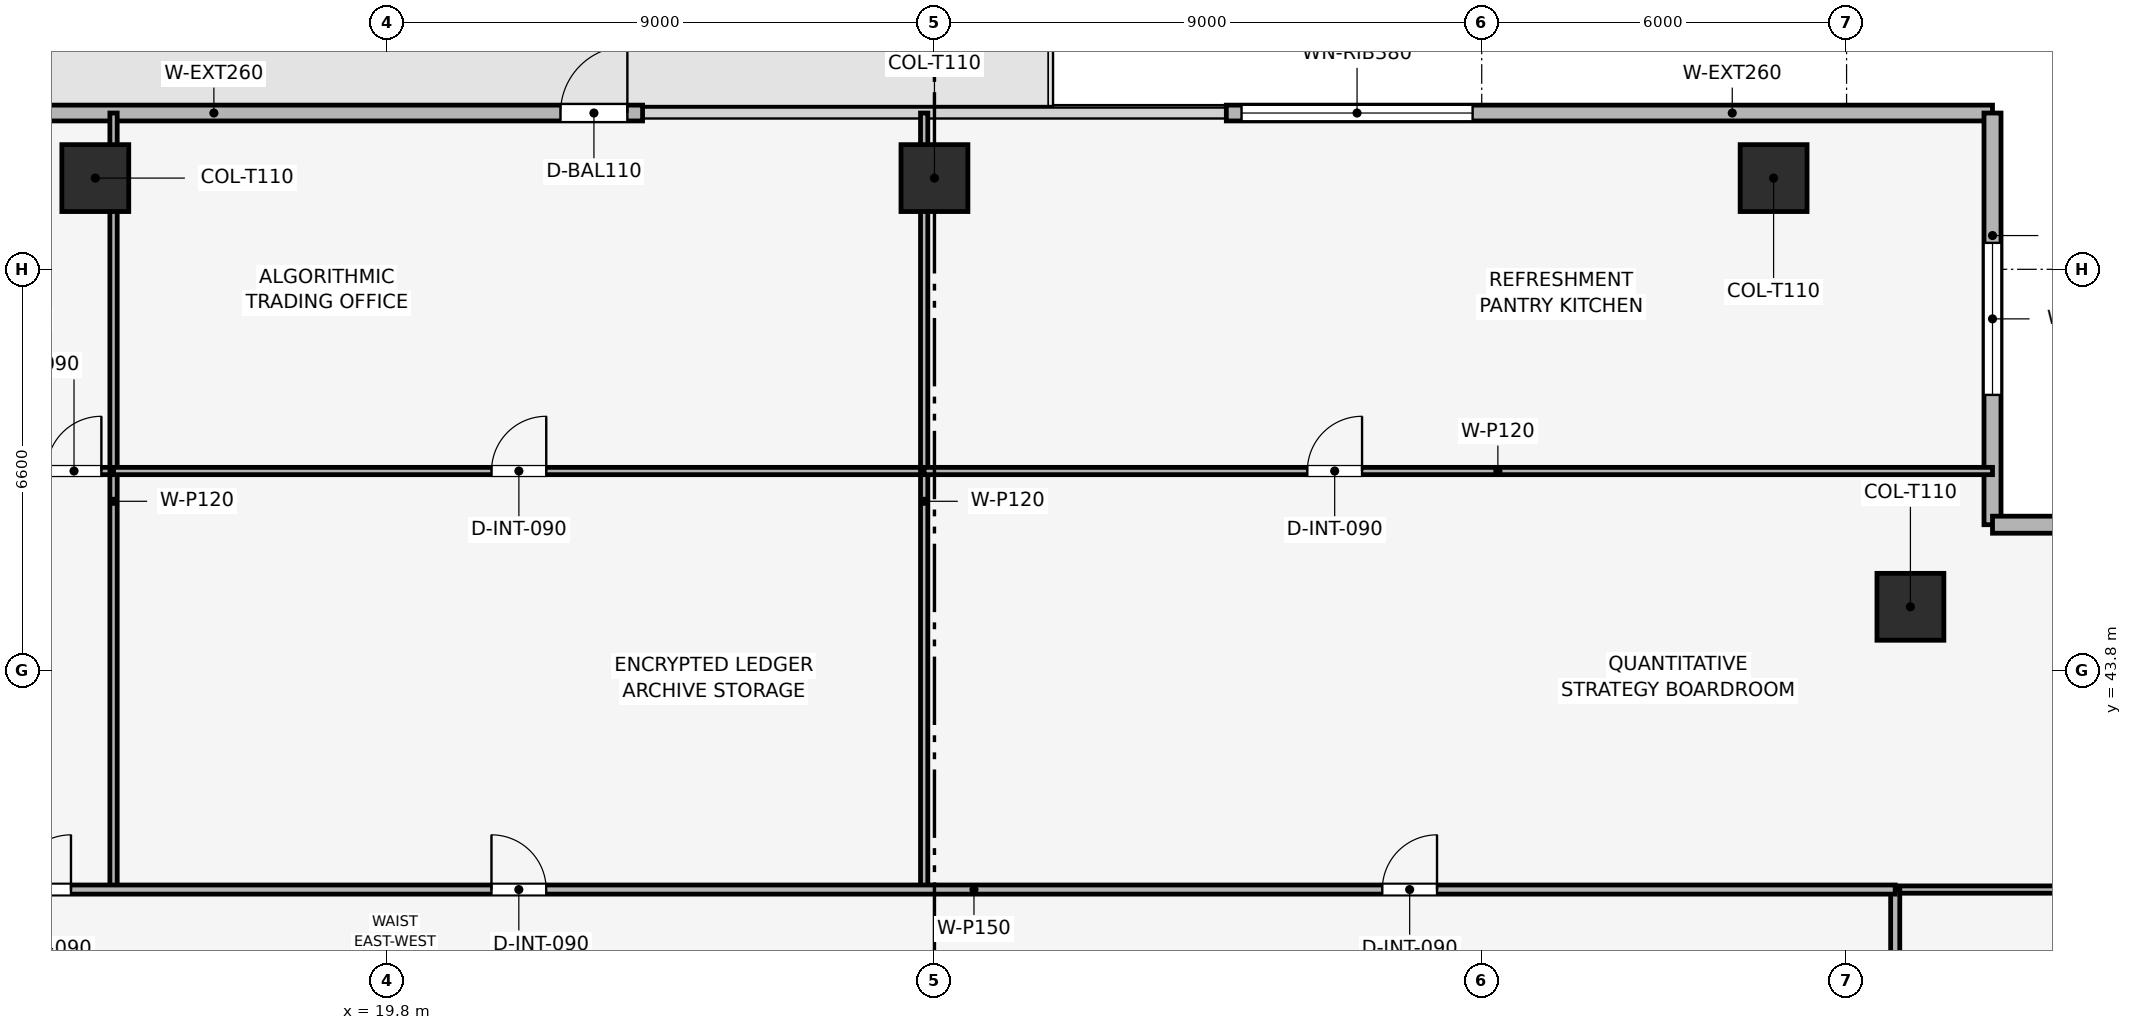
"""IFC4 building model, lengths in metres.
Left out: names, types, materials, properties, quantities, classifications, styles, units other than length and angle.
Written with IfcOpenShell. Run it as: python <this file> out.ifc"""

import sys

from ifc_helpers import new_model, si_unit, direction, frame, frame_2d, origin, origin_2d, place, context, subcontext, project, spatial, rectangle, extrude, element, fill, save


model = new_model("IFC4")
c1 = context("Model", 3, precision=1e-05, world=origin(), true_north=direction((0.0, 1.0)))
c2 = subcontext(c1, "Body", "Model", "MODEL_VIEW")
j1 = project(units=[si_unit("LENGTHUNIT", "METRE"), si_unit("PLANEANGLEUNIT", "RADIAN")], contexts=[c1])
p1 = place(None, origin())
s1 = spatial("IfcSite", under=j1, at=p1, CompositionType="ELEMENT")
p2 = place(p1, origin())
s2 = spatial("IfcBuilding", under=s1, at=p2, CompositionType="ELEMENT")
p3 = place(p2, frame((0.0, 0.0, 153.3)))
s3 = spatial("IfcBuildingStorey", under=s2, at=p3, CompositionType="ELEMENT", Elevation=153.3)
for number, where, z_axis, x_axis in (
    (1, (42.6, 51.9, 0.003), (0.0, 0.0, 1.0), (1.0, 0.0, 0.0)),
    (2, (28.8, 51.9, 0.003), (0.0, 0.0, 1.0), (1.0, 0.0, 0.0)),
    (3, (15.0, 51.9, 0.003), (0.0, 0.0, 1.0), (1.0, 0.0, 0.0)),
    (4, (44.85, 44.85, 0.003), (0.0, 0.0, 1.0), (1.0, 0.0, 0.0)),
):
    element("IfcColumn", number, at=place(p3, frame(where, z_axis=z_axis, x_axis=x_axis)), inside=s3, PredefinedType="COLUMN", context=c2, shape_type="SweptSolid", body=[
        extrude(rectangle(XDim=1.1, YDim=1.1, at=origin_2d()), origin(), (0.0, 0.0, 1.0), 3.489),
    ])
p4 = place(p3, frame((11.4, 52.97, 0.0), z_axis=(0.0, 0.0, 1.0), x_axis=(1.0, 0.0, 0.0)))
e5 = element("IfcWall", 5, at=p4, inside=s3, PredefinedType="SOLIDWALL", context=c2, shape_type="SweptSolid", body=[
    extrude(rectangle(XDim=12.6, YDim=0.26, at=frame_2d((6.3, 0.0))), origin(), (0.0, 0.0, 1.0), 3.495),
])
p5 = place(p4, frame((11.25, 0.0, 0.0)))
e6 = element("IfcOpeningElement", 6, at=p5, cuts=e5, PredefinedType="OPENING", context=c2, shape_type="SweptSolid", body=[
    extrude(rectangle(XDim=1.1, YDim=2.2, at=frame_2d((0.55, 1.1))), frame((0.0, 0.14, 0.0), z_axis=(0.0, -1.0, 0.0), x_axis=(1.0, 0.0, 0.0)), (0.0, 0.0, 1.0), 0.28),
])
p6 = place(p3, frame((33.6, 52.97, 0.0), z_axis=(0.0, 0.0, 1.0), x_axis=(1.0, 0.0, 0.0)))
e7 = element("IfcWall", 7, at=p6, inside=s3, PredefinedType="SOLIDWALL", context=c2, shape_type="SweptSolid", body=[
    extrude(rectangle(XDim=12.6, YDim=0.26, at=frame_2d((6.3, 0.0))), origin(), (0.0, 0.0, 1.0), 3.495),
])
p7 = place(p6, frame((0.25, 0.0, 0.9)))
e8 = element("IfcOpeningElement", 8, at=p7, cuts=e7, PredefinedType="OPENING", context=c2, shape_type="SweptSolid", body=[
    extrude(rectangle(XDim=3.8, YDim=1.9, at=frame_2d((1.9, 0.95))), frame((0.0, 0.14, 0.0), z_axis=(0.0, -1.0, 0.0), x_axis=(1.0, 0.0, 0.0)), (0.0, 0.0, 1.0), 0.28),
])
p8 = place(p3, frame((46.2, 52.97, 0.0), z_axis=(0.0, 0.0, 1.0), x_axis=(0.0, -1.0, 0.0)))
e9 = element("IfcWall", 9, at=p8, inside=s3, PredefinedType="SOLIDWALL", context=c2, shape_type="SweptSolid", body=[
    extrude(rectangle(XDim=6.77, YDim=0.28, at=frame_2d((3.385, 0.0))), origin(), (0.0, 0.0, 1.0), 3.495),
])
p9 = place(p8, frame((2.135, 0.0, 0.9)))
e10 = element("IfcOpeningElement", 10, at=p9, cuts=e9, PredefinedType="OPENING", context=c2, shape_type="SweptSolid", body=[
    extrude(rectangle(XDim=2.5, YDim=1.9, at=frame_2d((1.25, 0.95))), frame((0.0, 0.15, 0.0), z_axis=(0.0, -1.0, 0.0), x_axis=(1.0, 0.0, 0.0)), (0.0, 0.0, 1.0), 0.3),
])
p10 = place(p3, frame((46.2, 46.2, 0.0), z_axis=(0.0, 0.0, 1.0), x_axis=(1.0, 0.0, 0.0)))
e11 = element("IfcWall", 11, at=p10, inside=s3, PredefinedType="SOLIDWALL", context=c2, shape_type="SweptSolid", body=[
    extrude(rectangle(XDim=6.77, YDim=0.28, at=frame_2d((3.385, 0.0))), origin(), (0.0, 0.0, 1.0), 3.495),
])
p11 = place(p10, frame((2.135, 0.0, 0.9)))
e12 = element("IfcOpeningElement", 12, at=p11, cuts=e11, PredefinedType="OPENING", context=c2, shape_type="SweptSolid", body=[
    extrude(rectangle(XDim=2.5, YDim=1.9, at=frame_2d((1.25, 0.95))), frame((0.0, 0.15, 0.0), z_axis=(0.0, -1.0, 0.0), x_axis=(1.0, 0.0, 0.0)), (0.0, 0.0, 1.0), 0.3),
])
p12 = place(p3, frame((11.4, 47.083, 0.0), z_axis=(0.0, 0.0, 1.0), x_axis=(1.0, 0.0, 0.0)))
e13 = element("IfcWall", 13, at=p12, inside=s3, PredefinedType="PARTITIONING", context=c2, shape_type="SweptSolid", body=[
    extrude(rectangle(XDim=3.9, YDim=0.12, at=frame_2d((1.95, 0.0))), origin(), (0.0, 0.0, 1.0), 2.98),
])
p13 = place(p12, frame((2.8, 0.0, 0.0)))
e14 = element("IfcOpeningElement", 14, at=p13, cuts=e13, PredefinedType="OPENING", context=c2, shape_type="SweptSolid", body=[
    extrude(rectangle(XDim=0.9, YDim=2.1, at=frame_2d((0.45, 1.05))), frame((0.0, 0.07, 0.0), z_axis=(0.0, -1.0, 0.0), x_axis=(1.0, 0.0, 0.0)), (0.0, 0.0, 1.0), 0.14),
])
p14 = place(p3, frame((15.3, 40.2, 0.0), z_axis=(0.0, 0.0, 1.0), x_axis=(0.0, 1.0, 0.0)))
e15 = element("IfcWall", 15, at=p14, inside=s3, PredefinedType="PARTITIONING", context=c2, shape_type="SweptSolid", body=[
    extrude(rectangle(XDim=12.77, YDim=0.12, at=frame_2d((6.385, 0.0))), origin(), (0.0, 0.0, 1.0), 2.98),
])
p15 = place(p3, frame((15.3, 47.083, 0.0), z_axis=(0.0, 0.0, 1.0), x_axis=(1.0, 0.0, 0.0)))
e16 = element("IfcWall", 16, at=p15, inside=s3, PredefinedType="PARTITIONING", context=c2, shape_type="SweptSolid", body=[
    extrude(rectangle(XDim=13.331, YDim=0.12, at=frame_2d((6.666, 0.0))), origin(), (0.0, 0.0, 1.0), 3.03),
])
p16 = place(p15, frame((6.216, 0.0, 0.0)))
e17 = element("IfcOpeningElement", 17, at=p16, cuts=e16, PredefinedType="OPENING", context=c2, shape_type="SweptSolid", body=[
    extrude(rectangle(XDim=0.9, YDim=2.1, at=frame_2d((0.45, 1.05))), frame((0.0, 0.07, 0.0), z_axis=(0.0, -1.0, 0.0), x_axis=(1.0, 0.0, 0.0)), (0.0, 0.0, 1.0), 0.14),
])
p17 = place(p3, frame((28.631, 40.2, 0.0), z_axis=(0.0, 0.0, 1.0), x_axis=(0.0, 1.0, 0.0)))
e18 = element("IfcWall", 18, at=p17, inside=s3, PredefinedType="PARTITIONING", context=c2, shape_type="SweptSolid", body=[
    extrude(rectangle(XDim=12.77, YDim=0.12, at=frame_2d((6.385, 0.0))), origin(), (0.0, 0.0, 1.0), 2.98),
])
p18 = place(p3, frame((28.631, 47.083, 0.0), z_axis=(0.0, 0.0, 1.0), x_axis=(1.0, 0.0, 0.0)))
e19 = element("IfcWall", 19, at=p18, inside=s3, PredefinedType="PARTITIONING", context=c2, shape_type="SweptSolid", body=[
    extrude(rectangle(XDim=17.569, YDim=0.12, at=frame_2d((8.784, 0.0))), origin(), (0.0, 0.0, 1.0), 2.98),
])
p19 = place(p18, frame((6.301, 0.0, 0.0)))
e20 = element("IfcOpeningElement", 20, at=p19, cuts=e19, PredefinedType="OPENING", context=c2, shape_type="SweptSolid", body=[
    extrude(rectangle(XDim=0.9, YDim=2.1, at=frame_2d((0.45, 1.05))), frame((0.0, 0.07, 0.0), z_axis=(0.0, -1.0, 0.0), x_axis=(1.0, 0.0, 0.0)), (0.0, 0.0, 1.0), 0.14),
])
p20 = place(p3, frame((44.6, 40.2, 0.0), z_axis=(0.0, 0.0, 1.0), x_axis=(1.0, 0.0, 0.0)))
e21 = element("IfcWall", 21, at=p20, inside=s3, PredefinedType="PARTITIONING", context=c2, shape_type="SweptSolid", body=[
    extrude(rectangle(XDim=8.37, YDim=0.12, at=frame_2d((4.185, 0.0))), origin(), (0.0, 0.0, 1.0), 2.98),
])
p21 = place(p3, frame((44.6, 37.8, 0.0), z_axis=(0.0, 0.0, 1.0), x_axis=(0.0, 1.0, 0.0)))
e22 = element("IfcWall", 22, at=p21, inside=s3, PredefinedType="PARTITIONING", context=c2, shape_type="SweptSolid", body=[
    extrude(rectangle(XDim=2.4, YDim=0.15, at=frame_2d((1.2, 0.0))), origin(), (0.0, 0.0, 1.0), 3.495),
])
p22 = place(p3, frame((13.0, 40.2, 0.0), z_axis=(0.0, 0.0, 1.0), x_axis=(1.0, 0.0, 0.0)))
e23 = element("IfcWall", 23, at=p22, inside=s3, PredefinedType="PARTITIONING", context=c2, shape_type="SweptSolid", body=[
    extrude(rectangle(XDim=31.6, YDim=0.15, at=frame_2d((15.8, 0.0))), origin(), (0.0, 0.0, 1.0), 3.03),
])
p23 = place(p22, frame((0.7, 0.0, 0.0)))
e24 = element("IfcOpeningElement", 24, at=p23, cuts=e23, PredefinedType="OPENING", context=c2, shape_type="SweptSolid", body=[
    extrude(rectangle(XDim=0.9, YDim=2.1, at=frame_2d((0.45, 1.05))), frame((0.0, 0.085, 0.0), z_axis=(0.0, -1.0, 0.0), x_axis=(1.0, 0.0, 0.0)), (0.0, 0.0, 1.0), 0.17),
])
p24 = place(p22, frame((8.515, 0.0, 0.0)))
e25 = element("IfcOpeningElement", 25, at=p24, cuts=e23, PredefinedType="OPENING", context=c2, shape_type="SweptSolid", body=[
    extrude(rectangle(XDim=0.9, YDim=2.1, at=frame_2d((0.45, 1.05))), frame((0.0, 0.085, 0.0), z_axis=(0.0, -1.0, 0.0), x_axis=(1.0, 0.0, 0.0)), (0.0, 0.0, 1.0), 0.17),
])
p25 = place(p22, frame((23.165, 0.0, 0.0)))
e26 = element("IfcOpeningElement", 26, at=p25, cuts=e23, PredefinedType="OPENING", context=c2, shape_type="SweptSolid", body=[
    extrude(rectangle(XDim=0.9, YDim=2.1, at=frame_2d((0.45, 1.05))), frame((0.0, 0.085, 0.0), z_axis=(0.0, -1.0, 0.0), x_axis=(1.0, 0.0, 0.0)), (0.0, 0.0, 1.0), 0.17),
])
p26 = place(p5, origin())
e27 = element("IfcDoor", 27, at=p26, inside=s3, OperationType="SINGLE_SWING_RIGHT", PredefinedType="DOOR", context=c2, shape_type="SweptSolid", body=[
    extrude(rectangle(XDim=1.1, YDim=2.2, at=frame_2d((0.55, 1.1))), frame((0.0, 0.025, 0.0), z_axis=(0.0, -1.0, 0.0), x_axis=(1.0, 0.0, 0.0)), (0.0, 0.0, 1.0), 0.05),
])
fill(e6, e27)
p27 = place(p7, origin())
e28 = element("IfcWindow", 28, at=p27, inside=s3, PartitioningType="SINGLE_PANEL", PredefinedType="WINDOW", context=c2, shape_type="SweptSolid", body=[
    extrude(rectangle(XDim=3.8, YDim=1.9, at=frame_2d((1.9, 0.95))), frame((0.0, 0.03, 0.0), z_axis=(0.0, -1.0, 0.0), x_axis=(1.0, 0.0, 0.0)), (0.0, 0.0, 1.0), 0.06),
])
fill(e8, e28)
p28 = place(p9, origin())
e29 = element("IfcWindow", 29, at=p28, inside=s3, PartitioningType="SINGLE_PANEL", PredefinedType="WINDOW", context=c2, shape_type="SweptSolid", body=[
    extrude(rectangle(XDim=2.5, YDim=1.9, at=frame_2d((1.25, 0.95))), frame((0.0, 0.03, 0.0), z_axis=(0.0, -1.0, 0.0), x_axis=(1.0, 0.0, 0.0)), (0.0, 0.0, 1.0), 0.06),
])
fill(e10, e29)
p29 = place(p13, origin())
e30 = element("IfcDoor", 30, at=p29, inside=s3, OperationType="SINGLE_SWING_RIGHT", PredefinedType="DOOR", context=c2, shape_type="SweptSolid", body=[
    extrude(rectangle(XDim=0.9, YDim=2.1, at=frame_2d((0.45, 1.05))), frame((0.0, 0.025, 0.0), z_axis=(0.0, -1.0, 0.0), x_axis=(1.0, 0.0, 0.0)), (0.0, 0.0, 1.0), 0.05),
])
fill(e14, e30)
p30 = place(p16, origin())
e31 = element("IfcDoor", 31, at=p30, inside=s3, OperationType="SINGLE_SWING_RIGHT", PredefinedType="DOOR", context=c2, shape_type="SweptSolid", body=[
    extrude(rectangle(XDim=0.9, YDim=2.1, at=frame_2d((0.45, 1.05))), frame((0.0, 0.025, 0.0), z_axis=(0.0, -1.0, 0.0), x_axis=(1.0, 0.0, 0.0)), (0.0, 0.0, 1.0), 0.05),
])
fill(e17, e31)
p31 = place(p19, origin())
e32 = element("IfcDoor", 32, at=p31, inside=s3, OperationType="SINGLE_SWING_RIGHT", PredefinedType="DOOR", context=c2, shape_type="SweptSolid", body=[
    extrude(rectangle(XDim=0.9, YDim=2.1, at=frame_2d((0.45, 1.05))), frame((0.0, 0.025, 0.0), z_axis=(0.0, -1.0, 0.0), x_axis=(1.0, 0.0, 0.0)), (0.0, 0.0, 1.0), 0.05),
])
fill(e20, e32)
p32 = place(p23, origin())
e33 = element("IfcDoor", 33, at=p32, inside=s3, OperationType="SINGLE_SWING_RIGHT", PredefinedType="DOOR", context=c2, shape_type="SweptSolid", body=[
    extrude(rectangle(XDim=0.9, YDim=2.1, at=frame_2d((0.45, 1.05))), frame((0.0, 0.025, 0.0), z_axis=(0.0, -1.0, 0.0), x_axis=(1.0, 0.0, 0.0)), (0.0, 0.0, 1.0), 0.05),
])
fill(e24, e33)
p33 = place(p24, origin())
e34 = element("IfcDoor", 34, at=p33, inside=s3, OperationType="SINGLE_SWING_LEFT", PredefinedType="DOOR", context=c2, shape_type="SweptSolid", body=[
    extrude(rectangle(XDim=0.9, YDim=2.1, at=frame_2d((0.45, 1.05))), frame((0.0, 0.025, 0.0), z_axis=(0.0, -1.0, 0.0), x_axis=(1.0, 0.0, 0.0)), (0.0, 0.0, 1.0), 0.05),
])
fill(e25, e34)
p34 = place(p25, origin())
e35 = element("IfcDoor", 35, at=p34, inside=s3, OperationType="SINGLE_SWING_RIGHT", PredefinedType="DOOR", context=c2, shape_type="SweptSolid", body=[
    extrude(rectangle(XDim=0.9, YDim=2.1, at=frame_2d((0.45, 1.05))), frame((0.0, 0.025, 0.0), z_axis=(0.0, -1.0, 0.0), x_axis=(1.0, 0.0, 0.0)), (0.0, 0.0, 1.0), 0.05),
])
fill(e26, e35)
save(model, sys.argv[1])
